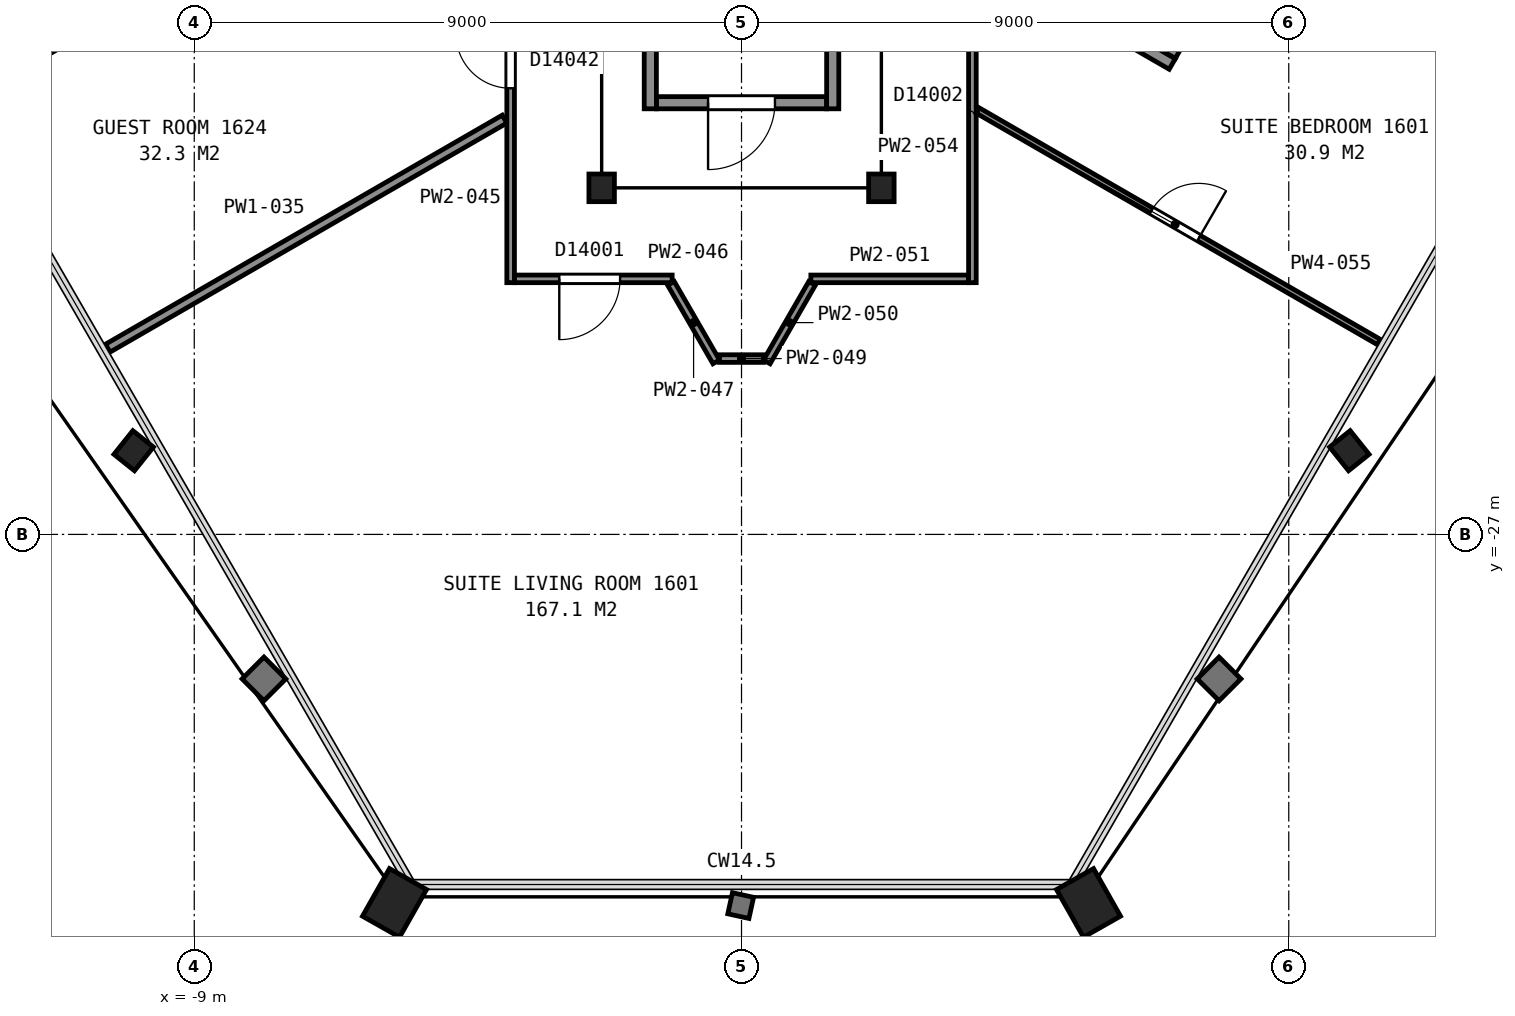
"""IFC4 building model, lengths in metres.
Left out: names, types, materials, properties, quantities, classifications, styles, units other than length and angle.
Written with IfcOpenShell. Run it as: python <this file> out.ifc"""

import sys

from ifc_helpers import new_model, si_unit, direction, frame, frame_2d, origin, origin_2d, place, context, subcontext, project, spatial, rectangle, hollow_rectangle, i_section, extrude, element, fill, save


model = new_model("IFC4")
c1 = context("Model", 3, precision=1e-05, world=origin(), true_north=direction((0.0, 1.0)))
c2 = subcontext(c1, "Body", "Model", "MODEL_VIEW")
j1 = project(units=[si_unit("LENGTHUNIT", "METRE"), si_unit("PLANEANGLEUNIT", "RADIAN")], contexts=[c1])
p1 = place(None, origin())
s1 = spatial("IfcSite", under=j1, at=p1, CompositionType="ELEMENT")
p2 = place(p1, origin())
s2 = spatial("IfcBuilding", under=s1, at=p2, CompositionType="ELEMENT")
p3 = place(p2, frame((0.0, 0.0, 72.8)))
s3 = spatial("IfcBuildingStorey", under=s2, at=p3, CompositionType="ELEMENT", Elevation=72.8)
p4 = place(p3, frame((-9.931, -25.542, 0.025), z_axis=(-0.055348484281, -0.069185605351, 0.996067215252), x_axis=(-0.499738716775, 0.865571791701, 0.032352563542)))
e1 = element("IfcColumn", 1, at=p4, inside=s3, PredefinedType="COLUMN", context=c2, shape_type="SweptSolid", body=[
    extrude(i_section(OverallWidth=0.432, OverallDepth=0.498, WebThickness=0.056, FlangeThickness=0.089, FilletRadius=0.015, at=origin_2d()), origin(), (0.0, 0.0, 1.0), 3.564),
])
for number, where, z_axis, x_axis in (
    (2, (-5.652, -32.963, 0.04), (-0.047, -0.083, 0.995), (-0.999, 0.0, -0.047)),
    (3, (5.652, -32.963, 0.04), (0.047, -0.083, 0.995), (-0.999, -0.0, 0.047)),
):
    element("IfcColumn", number, at=place(p3, frame(where, z_axis=z_axis, x_axis=x_axis)), inside=s3, PredefinedType="COLUMN", context=c2, shape_type="SweptSolid", body=[
        extrude(hollow_rectangle(XDim=0.7, YDim=0.9, WallThickness=0.065, at=origin_2d()), origin(), (0.0, 0.0, 1.0), 3.536),
    ])
p5 = place(p3, frame((9.931, -25.542, 0.025), z_axis=(0.055348484281, -0.069185605351, 0.996067215252), x_axis=(-0.499738716775, -0.865571791701, -0.032352563542)))
e4 = element("IfcColumn", 4, at=p5, inside=s3, PredefinedType="COLUMN", context=c2, shape_type="SweptSolid", body=[
    extrude(i_section(OverallWidth=0.432, OverallDepth=0.498, WebThickness=0.056, FlangeThickness=0.089, FilletRadius=0.015, at=origin_2d()), origin(), (0.0, 0.0, 1.0), 3.564),
])
for number, where, z_axis, x_axis in (
    (5, (-2.3, -21.3, 0.0), (0.0, 0.0, 1.0), (-1.0, 0.0, 0.0)),
    (6, (2.3, -21.3, 0.0), (0.0, 0.0, 1.0), (-1.0, 0.0, 0.0)),
):
    element("IfcColumn", number, at=place(p3, frame(where, z_axis=z_axis, x_axis=x_axis)), inside=s3, PredefinedType="COLUMN", context=c2, shape_type="SweptSolid", body=[
        extrude(i_section(OverallWidth=0.419, OverallDepth=0.455, WebThickness=0.042, FlangeThickness=0.068, FilletRadius=0.015, at=origin_2d()), origin(), (0.0, 0.0, 1.0), 3.6),
    ])
p6 = place(p3, frame((-1.4, -19.9, 0.0), z_axis=(0.0, 0.0, 1.0), x_axis=(1.0, 0.0, 0.0)))
e7 = element("IfcWall", 7, at=p6, inside=s3, PredefinedType="PARTITIONING", context=c2, shape_type="SweptSolid", body=[
    extrude(rectangle(XDim=2.8, YDim=0.2, at=frame_2d((1.4, 0.0))), origin(), (0.0, 0.0, 1.0), 3.35),
])
p7 = place(p6, frame((0.85, 0.0, 0.0)))
e8 = element("IfcOpeningElement", 8, at=p7, cuts=e7, PredefinedType="OPENING", context=c2, shape_type="SweptSolid", body=[
    extrude(rectangle(XDim=1.1, YDim=2.1, at=frame_2d((0.55, 1.05))), frame((0.0, 0.11, 0.0), z_axis=(0.0, -1.0, 0.0), x_axis=(1.0, 0.0, 0.0)), (0.0, 0.0, 1.0), 0.22),
])
for number, where, z_axis, x_axis in (
    (9, (1.5, -8.0, 0.0), (0.0, 0.0, 1.0), (0.0, -1.0, 0.0)),
    (10, (-1.5, -8.0, 0.0), (0.0, 0.0, 1.0), (0.0, -1.0, 0.0)),
):
    element("IfcWall", number, at=place(p3, frame(where, z_axis=z_axis, x_axis=x_axis)), inside=s3, PredefinedType="PARTITIONING", context=c2, shape_type="SweptSolid", body=[
        extrude(rectangle(XDim=12.0, YDim=0.2, at=frame_2d((6.0, 0.0))), origin(), (0.0, 0.0, 1.0), 3.35),
    ])
p8 = place(p3, frame((-12.794, -19.829, 0.0), z_axis=(0.0, 0.0, 1.0), x_axis=(0.866024716685, 0.500001190089, 0.0)))
e11 = element("IfcWall", 11, at=p8, inside=s3, PredefinedType="PARTITIONING", context=c2, shape_type="SweptSolid", body=[
    extrude(rectangle(XDim=8.492, YDim=0.15, at=frame_2d((4.246, 0.0))), origin(), (0.0, 0.0, 1.0), 2.613),
])
p9 = place(p3, frame((-10.423, -23.937, 0.0), z_axis=(0.0, 0.0, 1.0), x_axis=(0.866039368072, 0.499975812365, 0.0)))
e12 = element("IfcWall", 12, at=p9, inside=s3, PredefinedType="PARTITIONING", context=c2, shape_type="SweptSolid", body=[
    extrude(rectangle(XDim=7.535, YDim=0.15, at=frame_2d((3.768, 0.0))), origin(), (0.0, 0.0, 1.0), 2.613),
])
p10 = place(p3, frame((-3.797, -22.86, 0.0), z_axis=(0.0, 0.0, 1.0), x_axis=(0.0, 1.0, 0.0)))
e13 = element("IfcWall", 13, at=p10, inside=s3, PredefinedType="PARTITIONING", context=c2, shape_type="SweptSolid", body=[
    extrude(rectangle(XDim=4.471, YDim=0.125, at=frame_2d((2.235, 0.0))), origin(), (0.0, 0.0, 1.0), 2.613),
])
p11 = place(p10, frame((3.198, 0.0, 0.0)))
e14 = element("IfcOpeningElement", 14, at=p11, cuts=e13, PredefinedType="OPENING", context=c2, shape_type="SweptSolid", body=[
    extrude(rectangle(XDim=0.9, YDim=2.1, at=frame_2d((0.45, 1.05))), frame((0.0, 0.073, 0.0), z_axis=(0.0, -1.0, 0.0), x_axis=(1.0, 0.0, 0.0)), (0.0, 0.0, 1.0), 0.145),
])
p12 = place(p3, frame((-1.14, -22.797, 0.0), z_axis=(0.0, 0.0, 1.0), x_axis=(-1.0, 0.0, 0.0)))
e15 = element("IfcWall", 15, at=p12, inside=s3, PredefinedType="PARTITIONING", context=c2, shape_type="SweptSolid", body=[
    extrude(rectangle(XDim=2.592, YDim=0.125, at=frame_2d((1.296, 0.0))), origin(), (0.0, 0.0, 1.0), 2.613),
])
p13 = place(p12, frame((0.856, 0.0, 0.0)))
e16 = element("IfcOpeningElement", 16, at=p13, cuts=e15, PredefinedType="OPENING", context=c2, shape_type="SweptSolid", body=[
    extrude(rectangle(XDim=1.0, YDim=2.1, at=frame_2d((0.5, 1.05))), frame((0.0, 0.073, 0.0), z_axis=(0.0, -1.0, 0.0), x_axis=(1.0, 0.0, 0.0)), (0.0, 0.0, 1.0), 0.145),
])
p14 = place(p3, frame((-1.161, -22.871, 0.0), z_axis=(0.0, 0.0, 1.0), x_axis=(0.499609040113, -0.866251006947, 0.0)))
e17 = element("IfcWall", 17, at=p14, inside=s3, PredefinedType="PARTITIONING", context=c2, shape_type="SweptSolid", body=[
    extrude(rectangle(XDim=1.491, YDim=0.125, at=frame_2d((0.746, 0.0))), origin(), (0.0, 0.0, 1.0), 2.613),
])
p15 = place(p3, frame((-0.362, -24.108, 0.0), z_axis=(0.0, 0.0, 1.0), x_axis=(1.0, 0.0, 0.0)))
e18 = element("IfcWall", 18, at=p15, inside=s3, PredefinedType="PARTITIONING", context=c2, shape_type="SweptSolid", body=[
    extrude(rectangle(XDim=0.724, YDim=0.125, at=frame_2d((0.362, 0.0))), origin(), (0.0, 0.0, 1.0), 2.613),
])
p16 = place(p3, frame((0.416, -24.162, 0.0), z_axis=(0.0, 0.0, 1.0), x_axis=(0.499609040113, 0.866251006947, 0.0)))
e19 = element("IfcWall", 19, at=p16, inside=s3, PredefinedType="PARTITIONING", context=c2, shape_type="SweptSolid", body=[
    extrude(rectangle(XDim=1.491, YDim=0.125, at=frame_2d((0.746, 0.0))), origin(), (0.0, 0.0, 1.0), 2.613),
])
p17 = place(p3, frame((1.14, -22.797, 0.0), z_axis=(0.0, 0.0, 1.0), x_axis=(1.0, 0.0, 0.0)))
e20 = element("IfcWall", 20, at=p17, inside=s3, PredefinedType="PARTITIONING", context=c2, shape_type="SweptSolid", body=[
    extrude(rectangle(XDim=2.592, YDim=0.125, at=frame_2d((1.296, 0.0))), origin(), (0.0, 0.0, 1.0), 2.613),
])
p18 = place(p3, frame((3.797, -22.86, 0.0), z_axis=(0.0, 0.0, 1.0), x_axis=(0.0, 1.0, 0.0)))
e21 = element("IfcWall", 21, at=p18, inside=s3, PredefinedType="PARTITIONING", context=c2, shape_type="SweptSolid", body=[
    extrude(rectangle(XDim=4.471, YDim=0.125, at=frame_2d((2.235, 0.0))), origin(), (0.0, 0.0, 1.0), 2.613),
])
p19 = place(p3, frame((3.885, -20.028, 0.0), z_axis=(0.0, 0.0, 1.0), x_axis=(0.866080975745, -0.499903734186, 0.0)))
e22 = element("IfcWall", 22, at=p19, inside=s3, PredefinedType="PARTITIONING", context=c2, shape_type="SweptSolid", body=[
    extrude(rectangle(XDim=7.617, YDim=0.1, at=frame_2d((3.808, 0.0))), origin(), (0.0, 0.0, 1.0), 2.613),
])
p20 = place(p19, frame((3.299, 0.0, 0.0)))
e23 = element("IfcOpeningElement", 23, at=p20, cuts=e22, PredefinedType="OPENING", context=c2, shape_type="SweptSolid", body=[
    extrude(rectangle(XDim=0.9, YDim=2.1, at=frame_2d((0.45, 1.05))), frame((0.0, 0.06, 0.0), z_axis=(0.0, -1.0, 0.0), x_axis=(1.0, 0.0, 0.0)), (0.0, 0.0, 1.0), 0.12),
])
p21 = place(p3, frame((4.258, -17.631, 0.0), z_axis=(0.0, 0.0, 1.0), x_axis=(0.865982457891, -0.500074377092, 0.0)))
e24 = element("IfcWall", 24, at=p21, inside=s3, PredefinedType="PARTITIONING", context=c2, shape_type="SweptSolid", body=[
    extrude(rectangle(XDim=3.263, YDim=0.2, at=frame_2d((1.631, 0.0))), origin(), (0.0, 0.0, 1.0), 2.613),
])
p22 = place(p3, frame((5.558, -15.38, 0.0), z_axis=(0.0, 0.0, 1.0), x_axis=(0.866022790583, -0.50000452617, 0.0)))
e25 = element("IfcWall", 25, at=p22, inside=s3, PredefinedType="PARTITIONING", context=c2, shape_type="SweptSolid", body=[
    extrude(rectangle(XDim=8.491, YDim=0.15, at=frame_2d((4.246, 0.0))), origin(), (0.0, 0.0, 1.0), 2.613),
])
p23 = place(p3, frame((7.049, -19.122, 0.0), z_axis=(0.0, 0.0, 1.0), x_axis=(0.491544985814, 0.870852184312, 0.0)))
e26 = element("IfcWall", 26, at=p23, inside=s3, PredefinedType="PARTITIONING", context=c2, shape_type="SweptSolid", body=[
    extrude(rectangle(XDim=2.419, YDim=0.2, at=frame_2d((1.209, 0.0))), origin(), (0.0, 0.0, 1.0), 2.613),
])
p24 = place(p23, frame((0.795, 0.0, 0.0)))
e27 = element("IfcOpeningElement", 27, at=p24, cuts=e26, PredefinedType="OPENING", context=c2, shape_type="SweptSolid", body=[
    extrude(rectangle(XDim=0.8, YDim=2.1, at=frame_2d((0.4, 1.05))), frame((0.0, 0.11, 0.0), z_axis=(0.0, -1.0, 0.0), x_axis=(1.0, 0.0, 0.0)), (0.0, 0.0, 1.0), 0.22),
])
p25 = place(p7, origin())
e28 = element("IfcDoor", 28, at=p25, inside=s3, OperationType="SINGLE_SWING_LEFT", PredefinedType="DOOR", context=c2, shape_type="SweptSolid", body=[
    extrude(rectangle(XDim=1.1, YDim=2.1, at=frame_2d((0.55, 1.05))), frame((0.0, 0.025, 0.0), z_axis=(0.0, -1.0, 0.0), x_axis=(1.0, 0.0, 0.0)), (0.0, 0.0, 1.0), 0.05),
])
fill(e8, e28)
p26 = place(p11, origin())
e29 = element("IfcDoor", 29, at=p26, inside=s3, OperationType="SINGLE_SWING_RIGHT", PredefinedType="DOOR", context=c2, shape_type="SweptSolid", body=[
    extrude(rectangle(XDim=0.9, YDim=2.1, at=frame_2d((0.45, 1.05))), frame((0.0, 0.025, 0.0), z_axis=(0.0, -1.0, 0.0), x_axis=(1.0, 0.0, 0.0)), (0.0, 0.0, 1.0), 0.05),
])
fill(e14, e29)
p27 = place(p13, origin())
e30 = element("IfcDoor", 30, at=p27, inside=s3, OperationType="SINGLE_SWING_RIGHT", PredefinedType="DOOR", context=c2, shape_type="SweptSolid", body=[
    extrude(rectangle(XDim=1.0, YDim=2.1, at=frame_2d((0.5, 1.05))), frame((0.0, 0.025, 0.0), z_axis=(0.0, -1.0, 0.0), x_axis=(1.0, 0.0, 0.0)), (0.0, 0.0, 1.0), 0.05),
])
fill(e16, e30)
p28 = place(p20, origin())
e31 = element("IfcDoor", 31, at=p28, inside=s3, OperationType="SINGLE_SWING_RIGHT", PredefinedType="DOOR", context=c2, shape_type="SweptSolid", body=[
    extrude(rectangle(XDim=0.9, YDim=2.1, at=frame_2d((0.45, 1.05))), frame((0.0, 0.025, 0.0), z_axis=(0.0, -1.0, 0.0), x_axis=(1.0, 0.0, 0.0)), (0.0, 0.0, 1.0), 0.05),
])
fill(e23, e31)
save(model, sys.argv[1])
